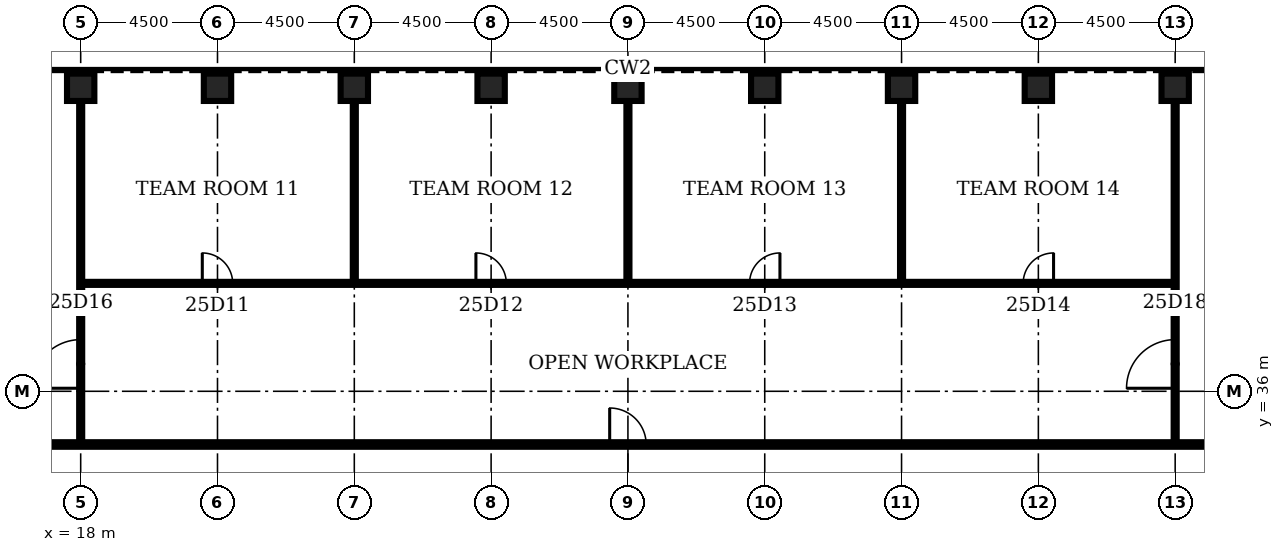
"""IFC4 building model, lengths in metres.
Left out: names, types, materials, properties, quantities, classifications, styles, units other than length and angle.
Written with IfcOpenShell. Run it as: python <this file> out.ifc"""

import sys

from ifc_helpers import new_model, si_unit, direction, frame, frame_2d, origin, origin_2d, place, context, subcontext, project, spatial, rectangle, hollow_rectangle, extrude, element, fill, save


model = new_model("IFC4")
c1 = context("Model", 3, precision=1e-05, world=origin(), true_north=direction((0.0, 1.0)))
c2 = subcontext(c1, "Body", "Model", "MODEL_VIEW")
j1 = project(units=[si_unit("LENGTHUNIT", "METRE"), si_unit("PLANEANGLEUNIT", "RADIAN")], contexts=[c1])
p1 = place(None, origin())
s1 = spatial("IfcSite", under=j1, at=p1, CompositionType="ELEMENT")
p2 = place(p1, origin())
s2 = spatial("IfcBuilding", under=s1, at=p2, CompositionType="ELEMENT")
p3 = place(p2, frame((0.0, 0.0, 117.3)))
s3 = spatial("IfcBuildingStorey", under=s2, at=p3, CompositionType="ELEMENT", Elevation=117.3)
for number, where, z_axis, x_axis in (
    (1, (54.0, 46.0, 0.0), (0.0, 0.0, 1.0), (0.0, 1.0, 0.0)),
    (2, (49.5, 46.0, 0.0), (0.0, 0.0, 1.0), (0.0, 1.0, 0.0)),
    (3, (45.0, 46.0, 0.0), (0.0, 0.0, 1.0), (0.0, 1.0, 0.0)),
    (4, (40.5, 46.0, 0.0), (0.0, 0.0, 1.0), (0.0, 1.0, 0.0)),
    (5, (36.0, 46.0, 0.0), (0.0, 0.0, 1.0), (0.0, 1.0, 0.0)),
    (6, (31.5, 46.0, 0.0), (0.0, 0.0, 1.0), (0.0, 1.0, 0.0)),
    (7, (27.0, 46.0, 0.0), (0.0, 0.0, 1.0), (0.0, 1.0, 0.0)),
    (8, (22.5, 46.0, 0.0), (0.0, 0.0, 1.0), (0.0, 1.0, 0.0)),
    (9, (18.0, 46.0, 0.0), (0.0, 0.0, 1.0), (0.0, 1.0, 0.0)),
):
    element("IfcColumn", number, at=place(p3, frame(where, z_axis=z_axis, x_axis=x_axis)), inside=s3, PredefinedType="COLUMN", context=c2, shape_type="SweptSolid", body=[
        extrude(hollow_rectangle(XDim=0.9, YDim=0.9, WallThickness=0.11, at=origin_2d()), origin(), (0.0, 0.0, 1.0), 4.2),
    ])
p4 = place(p3, frame((15.15, 34.25, 0.0), z_axis=(0.0, 0.0, 1.0), x_axis=(1.0, 0.0, 0.0)))
e10 = element("IfcWall", 10, at=p4, inside=s3, PredefinedType="PARTITIONING", context=c2, shape_type="SweptSolid", body=[
    extrude(rectangle(XDim=41.7, YDim=0.15, at=frame_2d((20.85, 0.0))), origin(), (0.0, 0.0, 1.0), 3.0),
])
p5 = place(p4, frame((20.25, 0.0, 0.0)))
e11 = element("IfcOpeningElement", 11, at=p5, cuts=e10, PredefinedType="OPENING", context=c2, shape_type="SweptSolid", body=[
    extrude(rectangle(XDim=1.2, YDim=2.1, at=frame_2d((0.6, 1.05))), frame((0.0, 0.085, 0.0), z_axis=(0.0, -1.0, 0.0), x_axis=(1.0, 0.0, 0.0)), (0.0, 0.0, 1.0), 0.17),
])
p6 = place(p3, frame((18.0, 39.55, 0.0), z_axis=(0.0, 0.0, 1.0), x_axis=(1.0, 0.0, 0.0)))
e12 = element("IfcWall", 12, at=p6, inside=s3, PredefinedType="PARTITIONING", context=c2, shape_type="SweptSolid", body=[
    extrude(rectangle(XDim=36.0, YDim=0.1, at=frame_2d((18.0, 0.0))), origin(), (0.0, 0.0, 1.0), 3.0),
])
p7 = place(p6, frame((4.0, 0.0, 0.0)))
e13 = element("IfcOpeningElement", 13, at=p7, cuts=e12, PredefinedType="OPENING", context=c2, shape_type="SweptSolid", body=[
    extrude(rectangle(XDim=1.0, YDim=2.1, at=frame_2d((0.5, 1.05))), frame((0.0, 0.06, 0.0), z_axis=(0.0, -1.0, 0.0), x_axis=(1.0, 0.0, 0.0)), (0.0, 0.0, 1.0), 0.12),
])
p8 = place(p6, frame((13.0, 0.0, 0.0)))
e14 = element("IfcOpeningElement", 14, at=p8, cuts=e12, PredefinedType="OPENING", context=c2, shape_type="SweptSolid", body=[
    extrude(rectangle(XDim=1.0, YDim=2.1, at=frame_2d((0.5, 1.05))), frame((0.0, 0.06, 0.0), z_axis=(0.0, -1.0, 0.0), x_axis=(1.0, 0.0, 0.0)), (0.0, 0.0, 1.0), 0.12),
])
p9 = place(p6, frame((22.0, 0.0, 0.0)))
e15 = element("IfcOpeningElement", 15, at=p9, cuts=e12, PredefinedType="OPENING", context=c2, shape_type="SweptSolid", body=[
    extrude(rectangle(XDim=1.0, YDim=2.1, at=frame_2d((0.5, 1.05))), frame((0.0, 0.06, 0.0), z_axis=(0.0, -1.0, 0.0), x_axis=(1.0, 0.0, 0.0)), (0.0, 0.0, 1.0), 0.12),
])
p10 = place(p6, frame((31.0, 0.0, 0.0)))
e16 = element("IfcOpeningElement", 16, at=p10, cuts=e12, PredefinedType="OPENING", context=c2, shape_type="SweptSolid", body=[
    extrude(rectangle(XDim=1.0, YDim=2.1, at=frame_2d((0.5, 1.05))), frame((0.0, 0.06, 0.0), z_axis=(0.0, -1.0, 0.0), x_axis=(1.0, 0.0, 0.0)), (0.0, 0.0, 1.0), 0.12),
])
p11 = place(p3, frame((18.0, 34.25, 0.0), z_axis=(0.0, 0.0, 1.0), x_axis=(0.0, 1.0, 0.0)))
e17 = element("IfcWall", 17, at=p11, inside=s3, PredefinedType="PARTITIONING", context=c2, shape_type="SweptSolid", body=[
    extrude(rectangle(XDim=11.3, YDim=0.1, at=frame_2d((5.65, 0.0))), origin(), (0.0, 0.0, 1.0), 3.0),
])
p12 = place(p11, frame((1.85, 0.0, 0.0)))
e18 = element("IfcOpeningElement", 18, at=p12, cuts=e17, PredefinedType="OPENING", context=c2, shape_type="SweptSolid", body=[
    extrude(rectangle(XDim=1.6, YDim=2.1, at=frame_2d((0.8, 1.05))), frame((0.0, 0.06, 0.0), z_axis=(0.0, -1.0, 0.0), x_axis=(1.0, 0.0, 0.0)), (0.0, 0.0, 1.0), 0.12),
])
for number, where, z_axis, x_axis in (
    (19, (27.0, 39.55, 0.0), (0.0, 0.0, 1.0), (0.0, 1.0, 0.0)),
    (20, (36.0, 39.55, 0.0), (0.0, 0.0, 1.0), (0.0, 1.0, 0.0)),
    (21, (45.0, 39.55, 0.0), (0.0, 0.0, 1.0), (0.0, 1.0, 0.0)),
):
    element("IfcWall", number, at=place(p3, frame(where, z_axis=z_axis, x_axis=x_axis)), inside=s3, PredefinedType="PARTITIONING", context=c2, shape_type="SweptSolid", body=[
        extrude(rectangle(XDim=6.0, YDim=0.1, at=frame_2d((3.0, 0.0))), origin(), (0.0, 0.0, 1.0), 3.0),
    ])
p13 = place(p3, frame((54.0, 34.25, 0.0), z_axis=(0.0, 0.0, 1.0), x_axis=(0.0, 1.0, 0.0)))
e22 = element("IfcWall", 22, at=p13, inside=s3, PredefinedType="PARTITIONING", context=c2, shape_type="SweptSolid", body=[
    extrude(rectangle(XDim=11.3, YDim=0.1, at=frame_2d((5.65, 0.0))), origin(), (0.0, 0.0, 1.0), 3.0),
])
p14 = place(p13, frame((1.85, 0.0, 0.0)))
e23 = element("IfcOpeningElement", 23, at=p14, cuts=e22, PredefinedType="OPENING", context=c2, shape_type="SweptSolid", body=[
    extrude(rectangle(XDim=1.6, YDim=2.1, at=frame_2d((0.8, 1.05))), frame((0.0, 0.06, 0.0), z_axis=(0.0, -1.0, 0.0), x_axis=(1.0, 0.0, 0.0)), (0.0, 0.0, 1.0), 0.12),
])
p15 = place(p7, origin())
e24 = element("IfcDoor", 24, at=p15, inside=s3, OperationType="SINGLE_SWING_LEFT", PredefinedType="DOOR", context=c2, shape_type="SweptSolid", body=[
    extrude(rectangle(XDim=1.0, YDim=2.1, at=frame_2d((0.5, 1.05))), frame((0.0, 0.025, 0.0), z_axis=(0.0, -1.0, 0.0), x_axis=(1.0, 0.0, 0.0)), (0.0, 0.0, 1.0), 0.05),
])
fill(e13, e24)
p16 = place(p8, origin())
e25 = element("IfcDoor", 25, at=p16, inside=s3, OperationType="SINGLE_SWING_LEFT", PredefinedType="DOOR", context=c2, shape_type="SweptSolid", body=[
    extrude(rectangle(XDim=1.0, YDim=2.1, at=frame_2d((0.5, 1.05))), frame((0.0, 0.025, 0.0), z_axis=(0.0, -1.0, 0.0), x_axis=(1.0, 0.0, 0.0)), (0.0, 0.0, 1.0), 0.05),
])
fill(e14, e25)
p17 = place(p9, origin())
e26 = element("IfcDoor", 26, at=p17, inside=s3, OperationType="SINGLE_SWING_RIGHT", PredefinedType="DOOR", context=c2, shape_type="SweptSolid", body=[
    extrude(rectangle(XDim=1.0, YDim=2.1, at=frame_2d((0.5, 1.05))), frame((0.0, 0.025, 0.0), z_axis=(0.0, -1.0, 0.0), x_axis=(1.0, 0.0, 0.0)), (0.0, 0.0, 1.0), 0.05),
])
fill(e15, e26)
p18 = place(p10, origin())
e27 = element("IfcDoor", 27, at=p18, inside=s3, OperationType="SINGLE_SWING_RIGHT", PredefinedType="DOOR", context=c2, shape_type="SweptSolid", body=[
    extrude(rectangle(XDim=1.0, YDim=2.1, at=frame_2d((0.5, 1.05))), frame((0.0, 0.025, 0.0), z_axis=(0.0, -1.0, 0.0), x_axis=(1.0, 0.0, 0.0)), (0.0, 0.0, 1.0), 0.05),
])
fill(e16, e27)
p19 = place(p12, origin())
e28 = element("IfcDoor", 28, at=p19, inside=s3, OperationType="SINGLE_SWING_LEFT", PredefinedType="DOOR", context=c2, shape_type="SweptSolid", body=[
    extrude(rectangle(XDim=1.6, YDim=2.1, at=frame_2d((0.8, 1.05))), frame((0.0, 0.025, 0.0), z_axis=(0.0, -1.0, 0.0), x_axis=(1.0, 0.0, 0.0)), (0.0, 0.0, 1.0), 0.05),
])
fill(e18, e28)
p20 = place(p14, origin())
e29 = element("IfcDoor", 29, at=p20, inside=s3, OperationType="SINGLE_SWING_LEFT", PredefinedType="DOOR", context=c2, shape_type="SweptSolid", body=[
    extrude(rectangle(XDim=1.6, YDim=2.1, at=frame_2d((0.8, 1.05))), frame((0.0, 0.025, 0.0), z_axis=(0.0, -1.0, 0.0), x_axis=(1.0, 0.0, 0.0)), (0.0, 0.0, 1.0), 0.05),
])
fill(e23, e29)
p21 = place(p5, origin())
e30 = element("IfcDoor", 30, at=p21, inside=s3, OperationType="SINGLE_SWING_LEFT", PredefinedType="DOOR", context=c2, shape_type="SweptSolid", body=[
    extrude(rectangle(XDim=1.2, YDim=2.1, at=frame_2d((0.6, 1.05))), frame((0.0, 0.025, 0.0), z_axis=(0.0, -1.0, 0.0), x_axis=(1.0, 0.0, 0.0)), (0.0, 0.0, 1.0), 0.05),
])
fill(e11, e30)
save(model, sys.argv[1])
